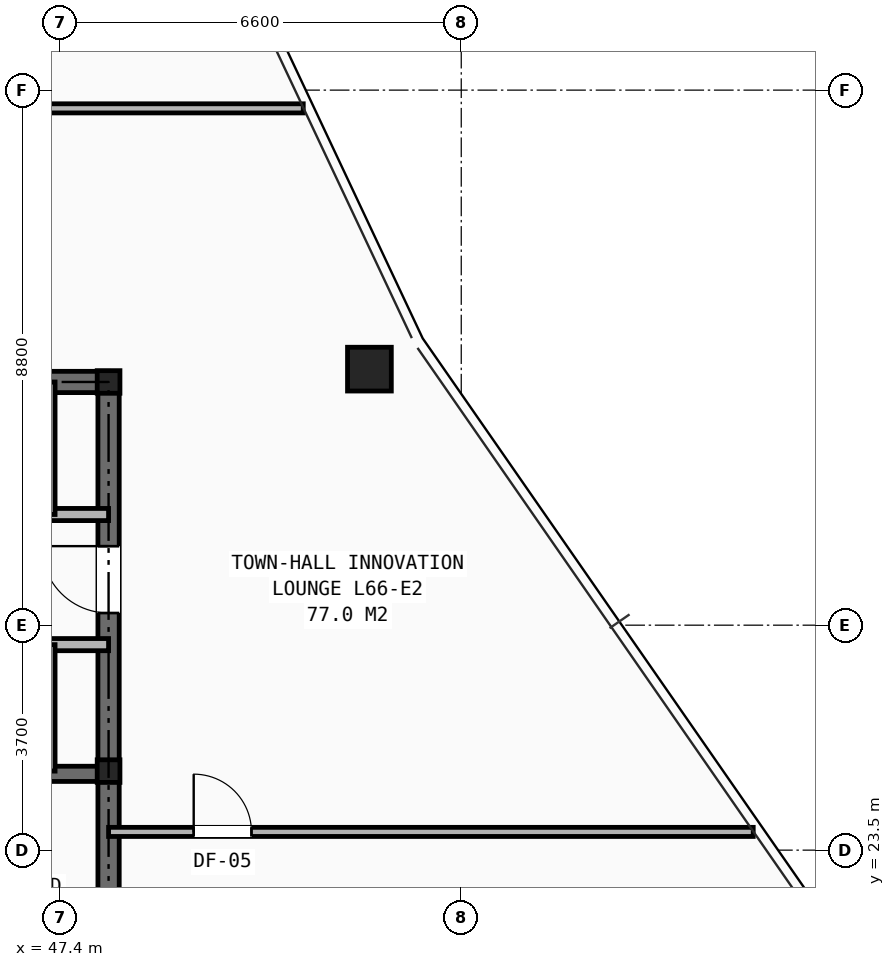
"""IFC4 building model, lengths in metres.
Left out: names, types, materials, properties, quantities, classifications, styles, units other than length and angle.
Written with IfcOpenShell. Run it as: python <this file> out.ifc"""

import sys

from ifc_helpers import new_model, si_unit, direction, frame, frame_2d, origin, origin_2d, place, context, subcontext, project, spatial, rectangle, hollow_rectangle, i_section, extrude, element, fill, save


model = new_model("IFC4")
c1 = context("Model", 3, precision=1e-05, world=origin(), true_north=direction((0.0, 1.0)))
c2 = subcontext(c1, "Body", "Model", "MODEL_VIEW")
j1 = project(units=[si_unit("LENGTHUNIT", "METRE"), si_unit("PLANEANGLEUNIT", "RADIAN")], contexts=[c1])
p1 = place(None, origin())
s1 = spatial("IfcSite", under=j1, at=p1, CompositionType="ELEMENT")
p2 = place(p1, origin())
s2 = spatial("IfcBuilding", under=s1, at=p2, CompositionType="ELEMENT")
p3 = place(p2, frame((0.0, 0.0, 232.9)))
s3 = spatial("IfcBuildingStorey", under=s2, at=p3, CompositionType="ELEMENT", Elevation=232.9)
for number, where, z_axis, x_axis in (
    (1, (48.2, 24.8, 0.0), (0.0, 0.0, 1.0), (1.0, 0.0, 0.0)),
    (2, (48.2, 31.2, 0.0), (0.0, 0.0, 1.0), (1.0, 0.0, 0.0)),
):
    element("IfcColumn", number, at=place(p3, frame(where, z_axis=z_axis, x_axis=x_axis)), inside=s3, PredefinedType="COLUMN", context=c2, shape_type="SweptSolid", body=[
        extrude(i_section(OverallWidth=0.374, OverallDepth=0.372, WebThickness=0.016, FlangeThickness=0.026, at=origin_2d()), origin(), (0.0, 0.0, 1.0), 3.5),
    ])
p4 = place(p3, frame((52.49, 31.411, 0.0), z_axis=(0.0, 0.0, 1.0), x_axis=(1.0, 0.0, 0.0)))
e3 = element("IfcColumn", 3, at=p4, inside=s3, PredefinedType="COLUMN", context=c2, shape_type="SweptSolid", body=[
    extrude(hollow_rectangle(XDim=0.72, YDim=0.72, WallThickness=0.05, at=origin_2d()), origin(), (0.0, 0.0, 1.0), 3.5),
])
p5 = place(p3, frame((31.8, 31.2, 0.0), z_axis=(0.0, 0.0, 1.0), x_axis=(1.0, 0.0, 0.0)))
e4 = element("IfcWall", 4, at=p5, inside=s3, PredefinedType="SHEAR", context=c2, shape_type="SweptSolid", body=[
    extrude(rectangle(XDim=16.4, YDim=0.35, at=frame_2d((8.2, 0.0))), origin(), (0.0, 0.0, 1.0), 3.25),
])
p6 = place(p3, frame((48.2, 16.4, 0.0), z_axis=(0.0, 0.0, 1.0), x_axis=(0.0, 1.0, 0.0)))
e5 = element("IfcWall", 5, at=p6, inside=s3, PredefinedType="SHEAR", context=c2, shape_type="SweptSolid", body=[
    extrude(rectangle(XDim=14.8, YDim=0.35, at=frame_2d((7.4, 0.0))), origin(), (0.0, 0.0, 1.0), 3.25),
])
p7 = place(p6, frame((11.0, 0.0, 0.0)))
e6 = element("IfcOpeningElement", 6, at=p7, cuts=e5, PredefinedType="OPENING", context=c2, shape_type="SweptSolid", body=[
    extrude(rectangle(XDim=1.1, YDim=2.15, at=frame_2d((0.55, 1.075))), frame((0.0, 0.185, 0.0), z_axis=(0.0, -1.0, 0.0), x_axis=(1.0, 0.0, 0.0)), (0.0, 0.0, 1.0), 0.37),
])
p8 = place(p3, frame((44.955, 24.755, 0.0), z_axis=(0.0, 0.0, 1.0), x_axis=(1.0, 0.0, 0.0)))
e7 = element("IfcWall", 7, at=p8, inside=s3, PredefinedType="SHEAR", context=c2, shape_type="SweptSolid", body=[
    extrude(rectangle(XDim=3.245, YDim=0.25, at=frame_2d((1.623, 0.0))), origin(), (0.0, 0.0, 1.0), 3.25),
])
p9 = place(p3, frame((33.82, 29.02, 0.0), z_axis=(0.0, 0.0, 1.0), x_axis=(1.0, 0.0, 0.0)))
e8 = element("IfcWall", 8, at=p9, inside=s3, PredefinedType="SOLIDWALL", context=c2, shape_type="SweptSolid", body=[
    extrude(rectangle(XDim=14.38, YDim=0.2, at=frame_2d((7.19, 0.0))), origin(), (0.0, 0.0, 1.0), 2.705),
])
p10 = place(p9, frame((3.92, 0.0, 0.0)))
e9 = element("IfcOpeningElement", 9, at=p10, cuts=e8, PredefinedType="OPENING", context=c2, shape_type="SweptSolid", body=[
    extrude(rectangle(XDim=0.9, YDim=2.1, at=frame_2d((0.45, 1.05))), frame((0.0, 0.11, 0.0), z_axis=(0.0, -1.0, 0.0), x_axis=(1.0, 0.0, 0.0)), (0.0, 0.0, 1.0), 0.22),
])
p11 = place(p9, frame((9.39, 0.0, 0.0)))
e10 = element("IfcOpeningElement", 10, at=p11, cuts=e8, PredefinedType="OPENING", context=c2, shape_type="SweptSolid", body=[
    extrude(rectangle(XDim=1.1, YDim=2.15, at=frame_2d((0.55, 1.075))), frame((0.0, 0.11, 0.0), z_axis=(0.0, -1.0, 0.0), x_axis=(1.0, 0.0, 0.0)), (0.0, 0.0, 1.0), 0.22),
])
p12 = place(p9, frame((11.71, 0.0, 0.0)))
e11 = element("IfcOpeningElement", 11, at=p12, cuts=e8, PredefinedType="OPENING", context=c2, shape_type="SweptSolid", body=[
    extrude(rectangle(XDim=1.1, YDim=2.15, at=frame_2d((0.55, 1.075))), frame((0.0, 0.11, 0.0), z_axis=(0.0, -1.0, 0.0), x_axis=(1.0, 0.0, 0.0)), (0.0, 0.0, 1.0), 0.22),
])
p13 = place(p3, frame((33.82, 26.88, 0.0), z_axis=(0.0, 0.0, 1.0), x_axis=(1.0, 0.0, 0.0)))
e12 = element("IfcWall", 12, at=p13, inside=s3, PredefinedType="SOLIDWALL", context=c2, shape_type="SweptSolid", body=[
    extrude(rectangle(XDim=14.38, YDim=0.2, at=frame_2d((7.19, 0.0))), origin(), (0.0, 0.0, 1.0), 2.705),
])
p14 = place(p13, frame((1.78, 0.0, 0.0)))
e13 = element("IfcOpeningElement", 13, at=p14, cuts=e12, PredefinedType="OPENING", context=c2, shape_type="SweptSolid", body=[
    extrude(rectangle(XDim=0.9, YDim=2.1, at=frame_2d((0.45, 1.05))), frame((0.0, 0.11, 0.0), z_axis=(0.0, -1.0, 0.0), x_axis=(1.0, 0.0, 0.0)), (0.0, 0.0, 1.0), 0.22),
])
p15 = place(p13, frame((6.07, 0.0, 0.0)))
e14 = element("IfcOpeningElement", 14, at=p15, cuts=e12, PredefinedType="OPENING", context=c2, shape_type="SweptSolid", body=[
    extrude(rectangle(XDim=0.9, YDim=2.1, at=frame_2d((0.45, 1.05))), frame((0.0, 0.11, 0.0), z_axis=(0.0, -1.0, 0.0), x_axis=(1.0, 0.0, 0.0)), (0.0, 0.0, 1.0), 0.22),
])
p16 = place(p13, frame((9.39, 0.0, 0.0)))
e15 = element("IfcOpeningElement", 15, at=p16, cuts=e12, PredefinedType="OPENING", context=c2, shape_type="SweptSolid", body=[
    extrude(rectangle(XDim=1.1, YDim=2.15, at=frame_2d((0.55, 1.075))), frame((0.0, 0.11, 0.0), z_axis=(0.0, -1.0, 0.0), x_axis=(1.0, 0.0, 0.0)), (0.0, 0.0, 1.0), 0.22),
])
p17 = place(p13, frame((11.71, 0.0, 0.0)))
e16 = element("IfcOpeningElement", 16, at=p17, cuts=e12, PredefinedType="OPENING", context=c2, shape_type="SweptSolid", body=[
    extrude(rectangle(XDim=1.1, YDim=2.15, at=frame_2d((0.55, 1.075))), frame((0.0, 0.11, 0.0), z_axis=(0.0, -1.0, 0.0), x_axis=(1.0, 0.0, 0.0)), (0.0, 0.0, 1.0), 0.22),
])
p18 = place(p3, frame((47.24, 29.02, 0.0), z_axis=(0.0, 0.0, 1.0), x_axis=(0.0, 1.0, 0.0)))
e17 = element("IfcWall", 17, at=p18, inside=s3, PredefinedType="SOLIDWALL", context=c2, shape_type="SweptSolid", body=[
    extrude(rectangle(XDim=2.18, YDim=0.16, at=frame_2d((1.09, 0.0))), origin(), (0.0, 0.0, 1.0), 2.705),
])
p19 = place(p3, frame((47.24, 24.8, 0.0), z_axis=(0.0, 0.0, 1.0), x_axis=(0.0, 1.0, 0.0)))
e18 = element("IfcWall", 18, at=p19, inside=s3, PredefinedType="SOLIDWALL", context=c2, shape_type="SweptSolid", body=[
    extrude(rectangle(XDim=2.08, YDim=0.16, at=frame_2d((1.04, 0.0))), origin(), (0.0, 0.0, 1.0), 3.25),
])
p20 = place(p3, frame((46.8, 35.7, 0.0), z_axis=(0.0, 0.0, 1.0), x_axis=(1.0, 0.0, 0.0)))
e19 = element("IfcWall", 19, at=p20, inside=s3, PredefinedType="PARTITIONING", context=c2, shape_type="SweptSolid", body=[
    extrude(rectangle(XDim=4.602, YDim=0.15, at=frame_2d((2.301, 0.0))), origin(), (0.0, 0.0, 1.0), 2.628),
])
p21 = place(p3, frame((48.2, 23.8, 0.0), z_axis=(0.0, 0.0, 1.0), x_axis=(1.0, 0.0, 0.0)))
e20 = element("IfcWall", 20, at=p21, inside=s3, PredefinedType="PARTITIONING", context=c2, shape_type="SweptSolid", body=[
    extrude(rectangle(XDim=10.602, YDim=0.15, at=frame_2d((5.301, 0.0))), origin(), (0.0, 0.0, 1.0), 2.628),
])
p22 = place(p21, frame((1.4, 0.0, 0.0)))
e21 = element("IfcOpeningElement", 21, at=p22, cuts=e20, PredefinedType="OPENING", context=c2, shape_type="SweptSolid", body=[
    extrude(rectangle(XDim=0.95, YDim=2.1, at=frame_2d((0.475, 1.05))), frame((0.0, 0.085, 0.0), z_axis=(0.0, -1.0, 0.0), x_axis=(1.0, 0.0, 0.0)), (0.0, 0.0, 1.0), 0.17),
])
p23 = place(p7, origin())
e22 = element("IfcDoor", 22, at=p23, inside=s3, OperationType="SINGLE_SWING_RIGHT", PredefinedType="DOOR", context=c2, shape_type="SweptSolid", body=[
    extrude(rectangle(XDim=1.1, YDim=2.15, at=frame_2d((0.55, 1.075))), frame((0.0, 0.025, 0.0), z_axis=(0.0, -1.0, 0.0), x_axis=(1.0, 0.0, 0.0)), (0.0, 0.0, 1.0), 0.05),
])
fill(e6, e22)
p24 = place(p22, origin())
e23 = element("IfcDoor", 23, at=p24, inside=s3, OperationType="SINGLE_SWING_LEFT", PredefinedType="DOOR", context=c2, shape_type="SweptSolid", body=[
    extrude(rectangle(XDim=0.95, YDim=2.1, at=frame_2d((0.475, 1.05))), frame((0.0, 0.025, 0.0), z_axis=(0.0, -1.0, 0.0), x_axis=(1.0, 0.0, 0.0)), (0.0, 0.0, 1.0), 0.05),
])
fill(e21, e23)
save(model, sys.argv[1])
